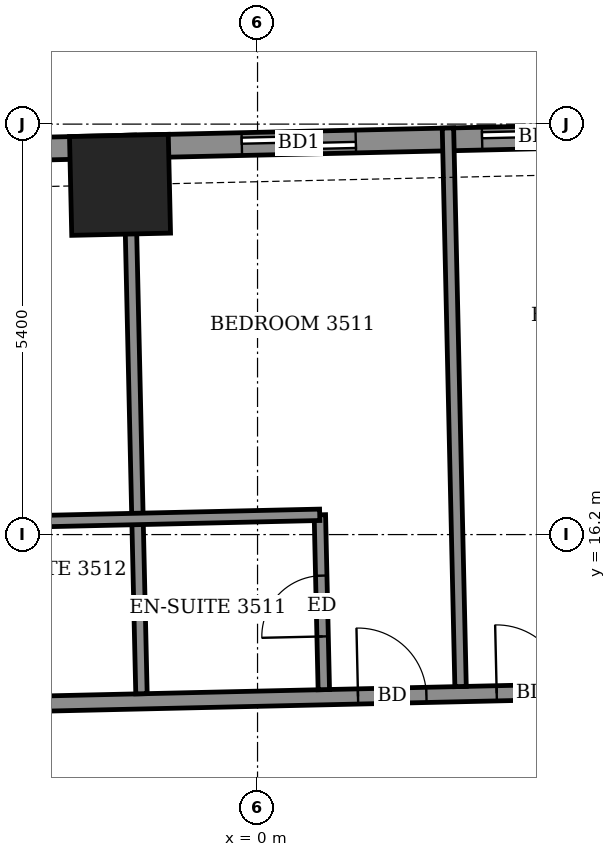
"""IFC4 building model, lengths in metres.
Left out: names, types, materials, properties, quantities, classifications, styles, units other than length and angle.
Written with IfcOpenShell. Run it as: python <this file> out.ifc"""

import sys

from ifc_helpers import new_model, si_unit, direction, frame, frame_2d, origin, origin_2d, place, context, subcontext, project, spatial, rectangle, extrude, element, fill, save


model = new_model("IFC4")
c1 = context("Model", 3, precision=1e-05, world=origin(), true_north=direction((0.0, 1.0)))
c2 = subcontext(c1, "Body", "Model", "MODEL_VIEW")
j1 = project(units=[si_unit("LENGTHUNIT", "METRE"), si_unit("PLANEANGLEUNIT", "RADIAN")], contexts=[c1])
p1 = place(None, origin())
s1 = spatial("IfcSite", under=j1, at=p1, CompositionType="ELEMENT")
p2 = place(p1, origin())
s2 = spatial("IfcBuilding", under=s1, at=p2, CompositionType="ELEMENT")
p3 = place(p2, frame((0.0, 0.0, 140.9)))
s3 = spatial("IfcBuildingStorey", under=s2, at=p3, CompositionType="ELEMENT", Elevation=140.9)
p4 = place(p3, frame((-1.809, 20.801, -0.55), z_axis=(0.0, 0.0, 1.0), x_axis=(-0.999742993665, -0.022670390785, 0.0)))
e1 = element("IfcColumn", 1, at=p4, inside=s3, PredefinedType="COLUMN", context=c2, shape_type="SweptSolid", body=[
    extrude(rectangle(XDim=1.3, YDim=1.3, at=origin_2d()), origin(), (0.0, 0.0, 1.0), 3.6),
])
p5 = place(p3, frame((19.396, 21.782, 0.0), z_axis=(0.0, 0.0, 1.0), x_axis=(-0.999742636707, -0.022686126826, 0.0)))
e2 = element("IfcWall", 2, at=p5, inside=s3, PredefinedType="SOLIDWALL", context=c2, shape_type="SweptSolid", body=[
    extrude(rectangle(XDim=42.444, YDim=0.3, at=frame_2d((21.222, 0.0))), origin(), (0.0, 0.0, 1.0), 3.05),
])
p6 = place(p5, frame((1.757, 0.0, 0.0)))
e3 = element("IfcOpeningElement", 3, at=p6, cuts=e2, PredefinedType="OPENING", context=c2, shape_type="SweptSolid", body=[
    extrude(rectangle(XDim=1.5, YDim=2.4, at=frame_2d((0.75, 1.2))), frame((0.0, 0.16, 0.0), z_axis=(0.0, -1.0, 0.0), x_axis=(1.0, 0.0, 0.0)), (0.0, 0.0, 1.0), 0.32),
])
p7 = place(p5, frame((4.634, 0.0, 0.0)))
e4 = element("IfcOpeningElement", 4, at=p7, cuts=e2, PredefinedType="OPENING", context=c2, shape_type="SweptSolid", body=[
    extrude(rectangle(XDim=1.5, YDim=2.4, at=frame_2d((0.75, 1.2))), frame((0.0, 0.16, 0.0), z_axis=(0.0, -1.0, 0.0), x_axis=(1.0, 0.0, 0.0)), (0.0, 0.0, 1.0), 0.32),
])
p8 = place(p5, frame((9.769, 0.0, 0.0)))
e5 = element("IfcOpeningElement", 5, at=p8, cuts=e2, PredefinedType="OPENING", context=c2, shape_type="SweptSolid", body=[
    extrude(rectangle(XDim=1.5, YDim=2.4, at=frame_2d((0.75, 1.2))), frame((0.0, 0.16, 0.0), z_axis=(0.0, -1.0, 0.0), x_axis=(1.0, 0.0, 0.0)), (0.0, 0.0, 1.0), 0.32),
])
p9 = place(p5, frame((14.946, 0.0, 0.0)))
e6 = element("IfcOpeningElement", 6, at=p9, cuts=e2, PredefinedType="OPENING", context=c2, shape_type="SweptSolid", body=[
    extrude(rectangle(XDim=1.5, YDim=2.4, at=frame_2d((0.75, 1.2))), frame((0.0, 0.16, 0.0), z_axis=(0.0, -1.0, 0.0), x_axis=(1.0, 0.0, 0.0)), (0.0, 0.0, 1.0), 0.32),
])
p10 = place(p5, frame((18.108, 0.0, 0.0)))
e7 = element("IfcOpeningElement", 7, at=p10, cuts=e2, PredefinedType="OPENING", context=c2, shape_type="SweptSolid", body=[
    extrude(rectangle(XDim=1.5, YDim=2.4, at=frame_2d((0.75, 1.2))), frame((0.0, 0.16, 0.0), z_axis=(0.0, -1.0, 0.0), x_axis=(1.0, 0.0, 0.0)), (0.0, 0.0, 1.0), 0.32),
])
p11 = place(p5, frame((22.733, 0.0, 0.0)))
e8 = element("IfcOpeningElement", 8, at=p11, cuts=e2, PredefinedType="OPENING", context=c2, shape_type="SweptSolid", body=[
    extrude(rectangle(XDim=1.5, YDim=2.4, at=frame_2d((0.75, 1.2))), frame((0.0, 0.16, 0.0), z_axis=(0.0, -1.0, 0.0), x_axis=(1.0, 0.0, 0.0)), (0.0, 0.0, 1.0), 0.32),
])
p12 = place(p5, frame((25.895, 0.0, 0.0)))
e9 = element("IfcOpeningElement", 9, at=p12, cuts=e2, PredefinedType="OPENING", context=c2, shape_type="SweptSolid", body=[
    extrude(rectangle(XDim=1.5, YDim=2.4, at=frame_2d((0.75, 1.2))), frame((0.0, 0.16, 0.0), z_axis=(0.0, -1.0, 0.0), x_axis=(1.0, 0.0, 0.0)), (0.0, 0.0, 1.0), 0.32),
])
p13 = place(p5, frame((30.944, 0.0, 0.0)))
e10 = element("IfcOpeningElement", 10, at=p13, cuts=e2, PredefinedType="OPENING", context=c2, shape_type="SweptSolid", body=[
    extrude(rectangle(XDim=1.5, YDim=2.4, at=frame_2d((0.75, 1.2))), frame((0.0, 0.16, 0.0), z_axis=(0.0, -1.0, 0.0), x_axis=(1.0, 0.0, 0.0)), (0.0, 0.0, 1.0), 0.32),
])
p14 = place(p5, frame((36.232, 0.0, 0.0)))
e11 = element("IfcOpeningElement", 11, at=p14, cuts=e2, PredefinedType="OPENING", context=c2, shape_type="SweptSolid", body=[
    extrude(rectangle(XDim=1.5, YDim=2.4, at=frame_2d((0.75, 1.2))), frame((0.0, 0.16, 0.0), z_axis=(0.0, -1.0, 0.0), x_axis=(1.0, 0.0, 0.0)), (0.0, 0.0, 1.0), 0.32),
])
p15 = place(p5, frame((38.612, 0.0, 0.9)))
e12 = element("IfcOpeningElement", 12, at=p15, cuts=e2, PredefinedType="OPENING", context=c2, shape_type="SweptSolid", body=[
    extrude(rectangle(XDim=2.4, YDim=1.5, at=frame_2d((1.2, 0.75))), frame((0.0, 0.16, 0.0), z_axis=(0.0, -1.0, 0.0), x_axis=(1.0, 0.0, 0.0)), (0.0, 0.0, 1.0), 0.32),
])
p16 = place(p3, frame((-26.421, 13.441, 0.0), z_axis=(0.0, 0.0, 1.0), x_axis=(0.999742754064, 0.022680954485, 0.0)))
e13 = element("IfcWall", 13, at=p16, inside=s3, PredefinedType="PARTITIONING", context=c2, shape_type="SweptSolid", body=[
    extrude(rectangle(XDim=48.945, YDim=0.2, at=frame_2d((24.472, 0.0))), origin(), (0.0, 0.0, 1.0), 3.05),
])
p17 = place(p16, frame((46.772, 0.0, 0.0)))
e14 = element("IfcOpeningElement", 14, at=p17, cuts=e13, PredefinedType="OPENING", context=c2, shape_type="SweptSolid", body=[
    extrude(rectangle(XDim=1.0, YDim=2.1, at=frame_2d((0.5, 1.05))), frame((0.0, 0.11, 0.0), z_axis=(0.0, -1.0, 0.0), x_axis=(1.0, 0.0, 0.0)), (0.0, 0.0, 1.0), 0.22),
])
p18 = place(p16, frame((42.55, 0.0, 0.0)))
e15 = element("IfcOpeningElement", 15, at=p18, cuts=e13, PredefinedType="OPENING", context=c2, shape_type="SweptSolid", body=[
    extrude(rectangle(XDim=0.9, YDim=2.1, at=frame_2d((0.45, 1.05))), frame((0.0, 0.11, 0.0), z_axis=(0.0, -1.0, 0.0), x_axis=(1.0, 0.0, 0.0)), (0.0, 0.0, 1.0), 0.22),
])
p19 = place(p16, frame((38.05, 0.0, 0.0)))
e16 = element("IfcOpeningElement", 16, at=p19, cuts=e13, PredefinedType="OPENING", context=c2, shape_type="SweptSolid", body=[
    extrude(rectangle(XDim=0.9, YDim=2.1, at=frame_2d((0.45, 1.05))), frame((0.0, 0.11, 0.0), z_axis=(0.0, -1.0, 0.0), x_axis=(1.0, 0.0, 0.0)), (0.0, 0.0, 1.0), 0.22),
])
p20 = place(p16, frame((36.225, 0.0, 0.0)))
e17 = element("IfcOpeningElement", 17, at=p20, cuts=e13, PredefinedType="OPENING", context=c2, shape_type="SweptSolid", body=[
    extrude(rectangle(XDim=0.9, YDim=2.1, at=frame_2d((0.45, 1.05))), frame((0.0, 0.11, 0.0), z_axis=(0.0, -1.0, 0.0), x_axis=(1.0, 0.0, 0.0)), (0.0, 0.0, 1.0), 0.22),
])
p21 = place(p16, frame((29.575, 0.0, 0.0)))
e18 = element("IfcOpeningElement", 18, at=p21, cuts=e13, PredefinedType="OPENING", context=c2, shape_type="SweptSolid", body=[
    extrude(rectangle(XDim=0.9, YDim=2.1, at=frame_2d((0.45, 1.05))), frame((0.0, 0.11, 0.0), z_axis=(0.0, -1.0, 0.0), x_axis=(1.0, 0.0, 0.0)), (0.0, 0.0, 1.0), 0.22),
])
p22 = place(p16, frame((27.75, 0.0, 0.0)))
e19 = element("IfcOpeningElement", 19, at=p22, cuts=e13, PredefinedType="OPENING", context=c2, shape_type="SweptSolid", body=[
    extrude(rectangle(XDim=0.9, YDim=2.1, at=frame_2d((0.45, 1.05))), frame((0.0, 0.11, 0.0), z_axis=(0.0, -1.0, 0.0), x_axis=(1.0, 0.0, 0.0)), (0.0, 0.0, 1.0), 0.22),
])
p23 = place(p16, frame((21.125, 0.0, 0.0)))
e20 = element("IfcOpeningElement", 20, at=p23, cuts=e13, PredefinedType="OPENING", context=c2, shape_type="SweptSolid", body=[
    extrude(rectangle(XDim=0.9, YDim=2.1, at=frame_2d((0.45, 1.05))), frame((0.0, 0.11, 0.0), z_axis=(0.0, -1.0, 0.0), x_axis=(1.0, 0.0, 0.0)), (0.0, 0.0, 1.0), 0.22),
])
p24 = place(p16, frame((19.275, 0.0, 0.0)))
e21 = element("IfcOpeningElement", 21, at=p24, cuts=e13, PredefinedType="OPENING", context=c2, shape_type="SweptSolid", body=[
    extrude(rectangle(XDim=0.9, YDim=2.1, at=frame_2d((0.45, 1.05))), frame((0.0, 0.11, 0.0), z_axis=(0.0, -1.0, 0.0), x_axis=(1.0, 0.0, 0.0)), (0.0, 0.0, 1.0), 0.22),
])
p25 = place(p16, frame((12.65, 0.0, 0.0)))
e22 = element("IfcOpeningElement", 22, at=p25, cuts=e13, PredefinedType="OPENING", context=c2, shape_type="SweptSolid", body=[
    extrude(rectangle(XDim=0.9, YDim=2.1, at=frame_2d((0.45, 1.05))), frame((0.0, 0.11, 0.0), z_axis=(0.0, -1.0, 0.0), x_axis=(1.0, 0.0, 0.0)), (0.0, 0.0, 1.0), 0.22),
])
p26 = place(p16, frame((10.8, 0.0, 0.0)))
e23 = element("IfcOpeningElement", 23, at=p26, cuts=e13, PredefinedType="OPENING", context=c2, shape_type="SweptSolid", body=[
    extrude(rectangle(XDim=0.9, YDim=2.1, at=frame_2d((0.45, 1.05))), frame((0.0, 0.11, 0.0), z_axis=(0.0, -1.0, 0.0), x_axis=(1.0, 0.0, 0.0)), (0.0, 0.0, 1.0), 0.22),
])
p27 = place(p16, frame((1.55, 0.0, 0.0)))
e24 = element("IfcOpeningElement", 24, at=p27, cuts=e13, PredefinedType="OPENING", context=c2, shape_type="SweptSolid", body=[
    extrude(rectangle(XDim=1.0, YDim=2.1, at=frame_2d((0.5, 1.05))), frame((0.0, 0.11, 0.0), z_axis=(0.0, -1.0, 0.0), x_axis=(1.0, 0.0, 0.0)), (0.0, 0.0, 1.0), 0.22),
])
p28 = place(p16, frame((6.25, 0.0, 0.0)))
e25 = element("IfcOpeningElement", 25, at=p28, cuts=e13, PredefinedType="OPENING", context=c2, shape_type="SweptSolid", body=[
    extrude(rectangle(XDim=0.9, YDim=2.1, at=frame_2d((0.45, 1.05))), frame((0.0, 0.11, 0.0), z_axis=(0.0, -1.0, 0.0), x_axis=(1.0, 0.0, 0.0)), (0.0, 0.0, 1.0), 0.22),
])
p29 = place(p3, frame((-1.527, 14.106, 0.0), z_axis=(0.0, 0.0, 1.0), x_axis=(-0.022719896304, 0.99974186984, 0.0)))
e26 = element("IfcWall", 26, at=p29, inside=s3, PredefinedType="PARTITIONING", context=c2, shape_type="SweptSolid", body=[
    extrude(rectangle(XDim=7.35, YDim=0.15, at=frame_2d((3.675, 0.0))), origin(), (0.0, 0.0, 1.0), 3.05),
])
p30 = place(p3, frame((0.872, 14.16, 0.0), z_axis=(0.0, 0.0, 1.0), x_axis=(-0.022603288534, 0.999744513037, 0.0)))
e27 = element("IfcWall", 27, at=p30, inside=s3, PredefinedType="PARTITIONING", context=c2, shape_type="SweptSolid", body=[
    extrude(rectangle(XDim=2.301, YDim=0.15, at=frame_2d((1.15, 0.0))), origin(), (0.0, 0.0, 1.0), 3.05),
])
p31 = place(p30, frame((0.7, 0.0, 0.0)))
e28 = element("IfcOpeningElement", 28, at=p31, cuts=e27, PredefinedType="OPENING", context=c2, shape_type="SweptSolid", body=[
    extrude(rectangle(XDim=0.8, YDim=2.1, at=frame_2d((0.4, 1.05))), frame((0.0, 0.085, 0.0), z_axis=(0.0, -1.0, 0.0), x_axis=(1.0, 0.0, 0.0)), (0.0, 0.0, 1.0), 0.17),
])
p32 = place(p3, frame((2.671, 14.201, 0.0), z_axis=(0.0, 0.0, 1.0), x_axis=(-0.022587099398, 0.999744878927, 0.0)))
e29 = element("IfcWall", 29, at=p32, inside=s3, PredefinedType="PARTITIONING", context=c2, shape_type="SweptSolid", body=[
    extrude(rectangle(XDim=7.35, YDim=0.15, at=frame_2d((3.675, 0.0))), origin(), (0.0, 0.0, 1.0), 2.55),
])
p33 = place(p3, frame((-3.981, 16.351, 0.0), z_axis=(0.0, 0.0, 1.0), x_axis=(0.999742701292, 0.022683280499, 0.0)))
e30 = element("IfcWall", 30, at=p33, inside=s3, PredefinedType="PARTITIONING", context=c2, shape_type="SweptSolid", body=[
    extrude(rectangle(XDim=4.8, YDim=0.15, at=frame_2d((2.4, 0.0))), origin(), (0.0, 0.0, 1.0), 3.05),
])
p34 = place(p9, origin())
e31 = element("IfcDoor", 31, at=p34, inside=s3, OperationType="SLIDING_TO_LEFT", PredefinedType="DOOR", context=c2, shape_type="SweptSolid", body=[
    extrude(rectangle(XDim=1.5, YDim=2.4, at=frame_2d((0.75, 1.2))), frame((0.0, 0.025, 0.0), z_axis=(0.0, -1.0, 0.0), x_axis=(1.0, 0.0, 0.0)), (0.0, 0.0, 1.0), 0.05),
])
fill(e6, e31)
p35 = place(p10, origin())
e32 = element("IfcDoor", 32, at=p35, inside=s3, OperationType="SLIDING_TO_LEFT", PredefinedType="DOOR", context=c2, shape_type="SweptSolid", body=[
    extrude(rectangle(XDim=1.5, YDim=2.4, at=frame_2d((0.75, 1.2))), frame((0.0, 0.025, 0.0), z_axis=(0.0, -1.0, 0.0), x_axis=(1.0, 0.0, 0.0)), (0.0, 0.0, 1.0), 0.05),
])
fill(e7, e32)
p36 = place(p21, origin())
e33 = element("IfcDoor", 33, at=p36, inside=s3, OperationType="SINGLE_SWING_RIGHT", PredefinedType="DOOR", context=c2, shape_type="SweptSolid", body=[
    extrude(rectangle(XDim=0.9, YDim=2.1, at=frame_2d((0.45, 1.05))), frame((0.0, 0.025, 0.0), z_axis=(0.0, -1.0, 0.0), x_axis=(1.0, 0.0, 0.0)), (0.0, 0.0, 1.0), 0.05),
])
fill(e18, e33)
p37 = place(p22, origin())
e34 = element("IfcDoor", 34, at=p37, inside=s3, OperationType="SINGLE_SWING_LEFT", PredefinedType="DOOR", context=c2, shape_type="SweptSolid", body=[
    extrude(rectangle(XDim=0.9, YDim=2.1, at=frame_2d((0.45, 1.05))), frame((0.0, 0.025, 0.0), z_axis=(0.0, -1.0, 0.0), x_axis=(1.0, 0.0, 0.0)), (0.0, 0.0, 1.0), 0.05),
])
fill(e19, e34)
p38 = place(p31, origin())
e35 = element("IfcDoor", 35, at=p38, inside=s3, OperationType="SINGLE_SWING_LEFT", PredefinedType="DOOR", context=c2, shape_type="SweptSolid", body=[
    extrude(rectangle(XDim=0.8, YDim=2.1, at=frame_2d((0.4, 1.05))), frame((0.0, 0.025, 0.0), z_axis=(0.0, -1.0, 0.0), x_axis=(1.0, 0.0, 0.0)), (0.0, 0.0, 1.0), 0.05),
])
fill(e28, e35)
save(model, sys.argv[1])
